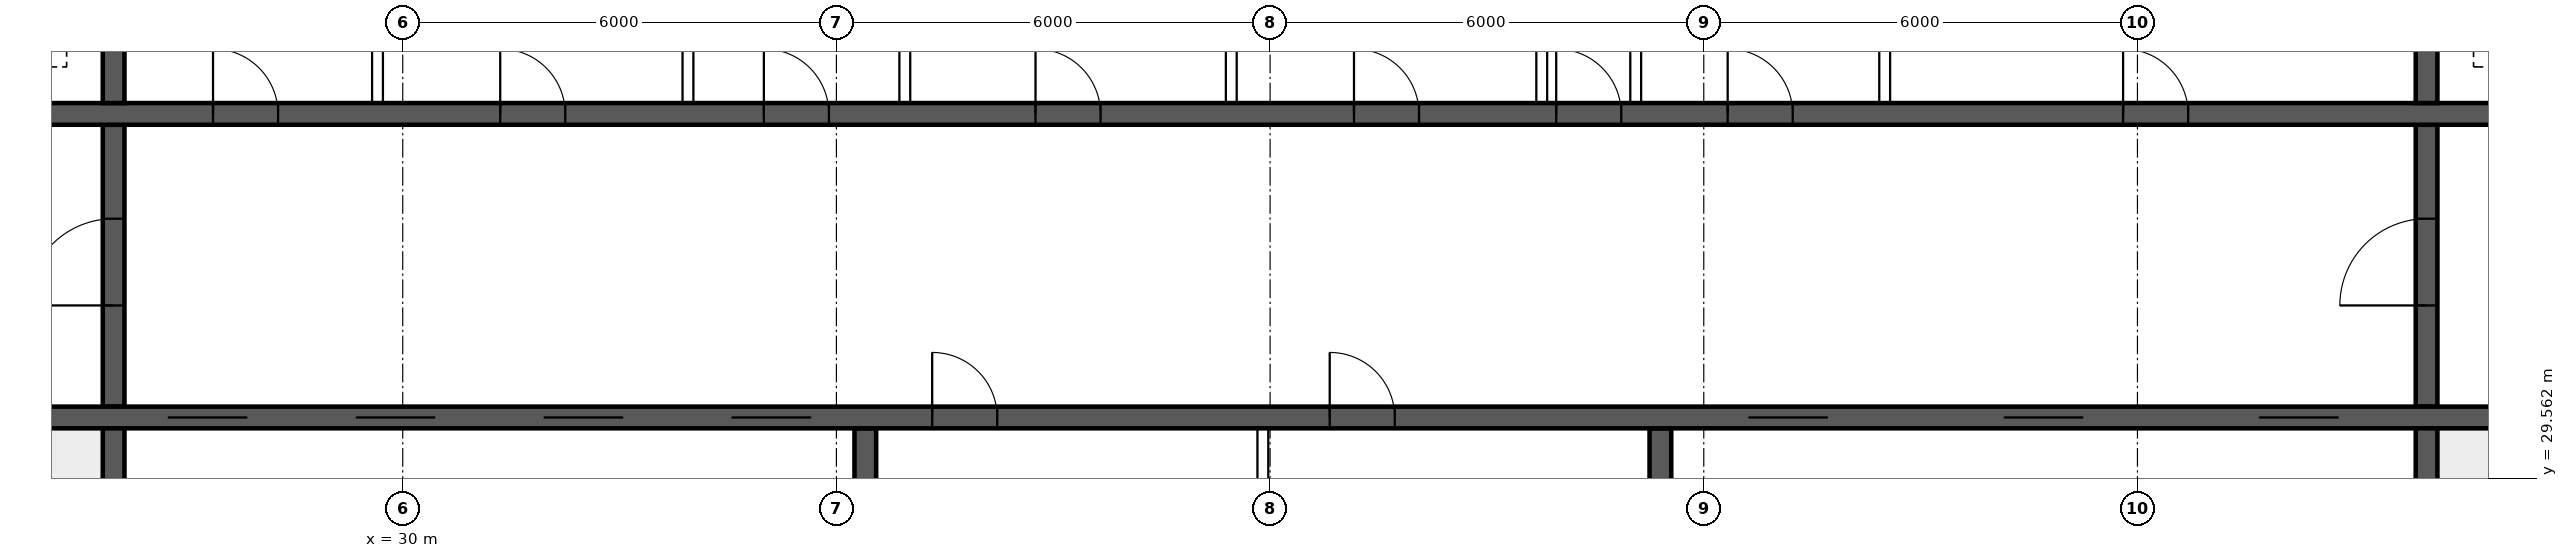
"""IFC4 building model, lengths in metres.
Left out: names, types, materials, properties, quantities, classifications, styles, units other than length and angle.
Written with IfcOpenShell. Run it as: python <this file> out.ifc"""

import sys

from ifc_helpers import new_model, si_unit, direction, frame, frame_2d, origin, place, context, subcontext, project, spatial, rectangle, extrude, element, fill, save


model = new_model("IFC4")
c1 = context("Model", 3, precision=1e-05, world=origin(), true_north=direction((0.0, 1.0)))
c2 = subcontext(c1, "Body", "Model", "MODEL_VIEW")
j1 = project(units=[si_unit("LENGTHUNIT", "METRE"), si_unit("PLANEANGLEUNIT", "RADIAN")], contexts=[c1])
p1 = place(None, origin())
s1 = spatial("IfcSite", under=j1, at=p1, CompositionType="ELEMENT")
p2 = place(p1, origin())
s2 = spatial("IfcBuilding", under=s1, at=p2, CompositionType="ELEMENT")
p3 = place(p2, frame((0.0, 0.0, 250.3)))
s3 = spatial("IfcBuildingStorey", under=s2, at=p3, CompositionType="ELEMENT", Elevation=250.3)
p4 = place(p3, frame((18.35, 30.4, 0.0), z_axis=(0.0, 0.0, 1.0), x_axis=(1.0, 0.0, 0.0)))
e1 = element("IfcWall", 1, at=p4, inside=s3, PredefinedType="SHEAR", context=c2, shape_type="SweptSolid", body=[
    extrude(rectangle(XDim=47.3, YDim=0.3, at=frame_2d((23.65, 0.0))), origin(), (0.0, 0.0, 1.0), 3.75),
])
p5 = place(p4, frame((0.4, 0.0, 0.0)))
e2 = element("IfcOpeningElement", 2, at=p5, cuts=e1, PredefinedType="OPENING", context=c2, shape_type="SweptSolid", body=[
    extrude(rectangle(XDim=1.0, YDim=2.1, at=frame_2d((0.5, 1.05))), frame((0.0, 0.16, 0.0), z_axis=(0.0, -1.0, 0.0), x_axis=(1.0, 0.0, 0.0)), (0.0, 0.0, 1.0), 0.32),
])
p6 = place(p4, frame((45.9, 0.0, 0.0)))
e3 = element("IfcOpeningElement", 3, at=p6, cuts=e1, PredefinedType="OPENING", context=c2, shape_type="SweptSolid", body=[
    extrude(rectangle(XDim=1.0, YDim=2.1, at=frame_2d((0.5, 1.05))), frame((0.0, 0.16, 0.0), z_axis=(0.0, -1.0, 0.0), x_axis=(1.0, 0.0, 0.0)), (0.0, 0.0, 1.0), 0.32),
])
p7 = place(p4, frame((8.4, 0.0, 0.0)))
e4 = element("IfcOpeningElement", 4, at=p7, cuts=e1, PredefinedType="OPENING", context=c2, shape_type="SweptSolid", body=[
    extrude(rectangle(XDim=1.1, YDim=2.1, at=frame_2d((0.55, 1.05))), frame((0.0, 0.16, 0.0), z_axis=(0.0, -1.0, 0.0), x_axis=(1.0, 0.0, 0.0)), (0.0, 0.0, 1.0), 0.32),
])
p8 = place(p4, frame((11.0, 0.0, 0.0)))
e5 = element("IfcOpeningElement", 5, at=p8, cuts=e1, PredefinedType="OPENING", context=c2, shape_type="SweptSolid", body=[
    extrude(rectangle(XDim=1.1, YDim=2.1, at=frame_2d((0.55, 1.05))), frame((0.0, 0.16, 0.0), z_axis=(0.0, -1.0, 0.0), x_axis=(1.0, 0.0, 0.0)), (0.0, 0.0, 1.0), 0.32),
])
p9 = place(p4, frame((13.6, 0.0, 0.0)))
e6 = element("IfcOpeningElement", 6, at=p9, cuts=e1, PredefinedType="OPENING", context=c2, shape_type="SweptSolid", body=[
    extrude(rectangle(XDim=1.1, YDim=2.1, at=frame_2d((0.55, 1.05))), frame((0.0, 0.16, 0.0), z_axis=(0.0, -1.0, 0.0), x_axis=(1.0, 0.0, 0.0)), (0.0, 0.0, 1.0), 0.32),
])
p10 = place(p4, frame((16.2, 0.0, 0.0)))
e7 = element("IfcOpeningElement", 7, at=p10, cuts=e1, PredefinedType="OPENING", context=c2, shape_type="SweptSolid", body=[
    extrude(rectangle(XDim=1.1, YDim=2.1, at=frame_2d((0.55, 1.05))), frame((0.0, 0.16, 0.0), z_axis=(0.0, -1.0, 0.0), x_axis=(1.0, 0.0, 0.0)), (0.0, 0.0, 1.0), 0.32),
])
p11 = place(p4, frame((18.975, 0.0, 0.0)))
e8 = element("IfcOpeningElement", 8, at=p11, cuts=e1, PredefinedType="OPENING", context=c2, shape_type="SweptSolid", body=[
    extrude(rectangle(XDim=0.9, YDim=2.1, at=frame_2d((0.45, 1.05))), frame((0.0, 0.16, 0.0), z_axis=(0.0, -1.0, 0.0), x_axis=(1.0, 0.0, 0.0)), (0.0, 0.0, 1.0), 0.32),
])
p12 = place(p4, frame((24.475, 0.0, 0.0)))
e9 = element("IfcOpeningElement", 9, at=p12, cuts=e1, PredefinedType="OPENING", context=c2, shape_type="SweptSolid", body=[
    extrude(rectangle(XDim=0.9, YDim=2.1, at=frame_2d((0.45, 1.05))), frame((0.0, 0.16, 0.0), z_axis=(0.0, -1.0, 0.0), x_axis=(1.0, 0.0, 0.0)), (0.0, 0.0, 1.0), 0.32),
])
p13 = place(p4, frame((30.267, 0.0, 0.0)))
e10 = element("IfcOpeningElement", 10, at=p13, cuts=e1, PredefinedType="OPENING", context=c2, shape_type="SweptSolid", body=[
    extrude(rectangle(XDim=1.1, YDim=2.1, at=frame_2d((0.55, 1.05))), frame((0.0, 0.16, 0.0), z_axis=(0.0, -1.0, 0.0), x_axis=(1.0, 0.0, 0.0)), (0.0, 0.0, 1.0), 0.32),
])
p14 = place(p4, frame((33.8, 0.0, 0.0)))
e11 = element("IfcOpeningElement", 11, at=p14, cuts=e1, PredefinedType="OPENING", context=c2, shape_type="SweptSolid", body=[
    extrude(rectangle(XDim=1.1, YDim=2.1, at=frame_2d((0.55, 1.05))), frame((0.0, 0.16, 0.0), z_axis=(0.0, -1.0, 0.0), x_axis=(1.0, 0.0, 0.0)), (0.0, 0.0, 1.0), 0.32),
])
p15 = place(p4, frame((37.333, 0.0, 0.0)))
e12 = element("IfcOpeningElement", 12, at=p15, cuts=e1, PredefinedType="OPENING", context=c2, shape_type="SweptSolid", body=[
    extrude(rectangle(XDim=1.1, YDim=2.1, at=frame_2d((0.55, 1.05))), frame((0.0, 0.16, 0.0), z_axis=(0.0, -1.0, 0.0), x_axis=(1.0, 0.0, 0.0)), (0.0, 0.0, 1.0), 0.32),
])
p16 = place(p3, frame((18.35, 34.6, 0.0), z_axis=(0.0, 0.0, 1.0), x_axis=(1.0, 0.0, 0.0)))
e13 = element("IfcWall", 13, at=p16, inside=s3, PredefinedType="SHEAR", context=c2, shape_type="SweptSolid", body=[
    extrude(rectangle(XDim=47.3, YDim=0.3, at=frame_2d((23.65, 0.0))), origin(), (0.0, 0.0, 1.0), 3.75),
])
p17 = place(p16, frame((0.9, 0.0, 0.0)))
e14 = element("IfcOpeningElement", 14, at=p17, cuts=e13, PredefinedType="OPENING", context=c2, shape_type="SweptSolid", body=[
    extrude(rectangle(XDim=1.1, YDim=2.1, at=frame_2d((0.55, 1.05))), frame((0.0, 0.16, 0.0), z_axis=(0.0, -1.0, 0.0), x_axis=(1.0, 0.0, 0.0)), (0.0, 0.0, 1.0), 0.32),
])
p18 = place(p16, frame((45.3, 0.0, 0.0)))
e15 = element("IfcOpeningElement", 15, at=p18, cuts=e13, PredefinedType="OPENING", context=c2, shape_type="SweptSolid", body=[
    extrude(rectangle(XDim=1.1, YDim=2.1, at=frame_2d((0.55, 1.05))), frame((0.0, 0.16, 0.0), z_axis=(0.0, -1.0, 0.0), x_axis=(1.0, 0.0, 0.0)), (0.0, 0.0, 1.0), 0.32),
])
p19 = place(p16, frame((4.25, 0.0, 0.0)))
e16 = element("IfcOpeningElement", 16, at=p19, cuts=e13, PredefinedType="OPENING", context=c2, shape_type="SweptSolid", body=[
    extrude(rectangle(XDim=0.9, YDim=2.1, at=frame_2d((0.45, 1.05))), frame((0.0, 0.16, 0.0), z_axis=(0.0, -1.0, 0.0), x_axis=(1.0, 0.0, 0.0)), (0.0, 0.0, 1.0), 0.32),
])
p20 = place(p16, frame((42.15, 0.0, 0.0)))
e17 = element("IfcOpeningElement", 17, at=p20, cuts=e13, PredefinedType="OPENING", context=c2, shape_type="SweptSolid", body=[
    extrude(rectangle(XDim=0.9, YDim=2.1, at=frame_2d((0.45, 1.05))), frame((0.0, 0.16, 0.0), z_axis=(0.0, -1.0, 0.0), x_axis=(1.0, 0.0, 0.0)), (0.0, 0.0, 1.0), 0.32),
])
p21 = place(p16, frame((9.025, 0.0, 0.0)))
e18 = element("IfcOpeningElement", 18, at=p21, cuts=e13, PredefinedType="OPENING", context=c2, shape_type="SweptSolid", body=[
    extrude(rectangle(XDim=0.9, YDim=2.1, at=frame_2d((0.45, 1.05))), frame((0.0, 0.16, 0.0), z_axis=(0.0, -1.0, 0.0), x_axis=(1.0, 0.0, 0.0)), (0.0, 0.0, 1.0), 0.32),
])
p22 = place(p16, frame((12.999, 0.0, 0.0)))
e19 = element("IfcOpeningElement", 19, at=p22, cuts=e13, PredefinedType="OPENING", context=c2, shape_type="SweptSolid", body=[
    extrude(rectangle(XDim=0.9, YDim=2.1, at=frame_2d((0.45, 1.05))), frame((0.0, 0.16, 0.0), z_axis=(0.0, -1.0, 0.0), x_axis=(1.0, 0.0, 0.0)), (0.0, 0.0, 1.0), 0.32),
])
p23 = place(p16, frame((16.646, 0.0, 0.0)))
e20 = element("IfcOpeningElement", 20, at=p23, cuts=e13, PredefinedType="OPENING", context=c2, shape_type="SweptSolid", body=[
    extrude(rectangle(XDim=0.9, YDim=2.1, at=frame_2d((0.45, 1.05))), frame((0.0, 0.16, 0.0), z_axis=(0.0, -1.0, 0.0), x_axis=(1.0, 0.0, 0.0)), (0.0, 0.0, 1.0), 0.32),
])
p24 = place(p16, frame((20.405, 0.0, 0.0)))
e21 = element("IfcOpeningElement", 21, at=p24, cuts=e13, PredefinedType="OPENING", context=c2, shape_type="SweptSolid", body=[
    extrude(rectangle(XDim=0.9, YDim=2.1, at=frame_2d((0.45, 1.05))), frame((0.0, 0.16, 0.0), z_axis=(0.0, -1.0, 0.0), x_axis=(1.0, 0.0, 0.0)), (0.0, 0.0, 1.0), 0.32),
])
p25 = place(p16, frame((24.811, 0.0, 0.0)))
e22 = element("IfcOpeningElement", 22, at=p25, cuts=e13, PredefinedType="OPENING", context=c2, shape_type="SweptSolid", body=[
    extrude(rectangle(XDim=0.9, YDim=2.1, at=frame_2d((0.45, 1.05))), frame((0.0, 0.16, 0.0), z_axis=(0.0, -1.0, 0.0), x_axis=(1.0, 0.0, 0.0)), (0.0, 0.0, 1.0), 0.32),
])
p26 = place(p16, frame((27.608, 0.0, 0.0)))
e23 = element("IfcOpeningElement", 23, at=p26, cuts=e13, PredefinedType="OPENING", context=c2, shape_type="SweptSolid", body=[
    extrude(rectangle(XDim=0.9, YDim=2.1, at=frame_2d((0.45, 1.05))), frame((0.0, 0.16, 0.0), z_axis=(0.0, -1.0, 0.0), x_axis=(1.0, 0.0, 0.0)), (0.0, 0.0, 1.0), 0.32),
])
p27 = place(p16, frame((29.981, 0.0, 0.0)))
e24 = element("IfcOpeningElement", 24, at=p27, cuts=e13, PredefinedType="OPENING", context=c2, shape_type="SweptSolid", body=[
    extrude(rectangle(XDim=0.9, YDim=2.1, at=frame_2d((0.45, 1.05))), frame((0.0, 0.16, 0.0), z_axis=(0.0, -1.0, 0.0), x_axis=(1.0, 0.0, 0.0)), (0.0, 0.0, 1.0), 0.32),
])
p28 = place(p16, frame((35.451, 0.0, 0.0)))
e25 = element("IfcOpeningElement", 25, at=p28, cuts=e13, PredefinedType="OPENING", context=c2, shape_type="SweptSolid", body=[
    extrude(rectangle(XDim=0.9, YDim=2.1, at=frame_2d((0.45, 1.05))), frame((0.0, 0.16, 0.0), z_axis=(0.0, -1.0, 0.0), x_axis=(1.0, 0.0, 0.0)), (0.0, 0.0, 1.0), 0.32),
])
for number, where, z_axis, x_axis in (
    (26, (26.0, 26.15, 0.0), (0.0, 0.0, 1.0), (0.0, 1.0, 0.0)),
    (27, (58.0, 26.15, 0.0), (0.0, 0.0, 1.0), (0.0, 1.0, 0.0)),
):
    element("IfcWall", number, at=place(p3, frame(where, z_axis=z_axis, x_axis=x_axis)), inside=s3, PredefinedType="SHEAR", context=c2, shape_type="SweptSolid", body=[
        extrude(rectangle(XDim=4.1, YDim=0.3, at=frame_2d((2.05, 0.0))), origin(), (0.0, 0.0, 1.0), 3.75),
    ])
p29 = place(p3, frame((26.0, 30.55, 0.0), z_axis=(0.0, 0.0, 1.0), x_axis=(0.0, 1.0, 0.0)))
e28 = element("IfcWall", 28, at=p29, inside=s3, PredefinedType="SHEAR", context=c2, shape_type="SweptSolid", body=[
    extrude(rectangle(XDim=3.9, YDim=0.3, at=frame_2d((1.95, 0.0))), origin(), (0.0, 0.0, 1.0), 3.75),
])
p30 = place(p29, frame((1.4, 0.0, 0.0)))
e29 = element("IfcOpeningElement", 29, at=p30, cuts=e28, PredefinedType="OPENING", context=c2, shape_type="SweptSolid", body=[
    extrude(rectangle(XDim=1.2, YDim=2.1, at=frame_2d((0.6, 1.05))), frame((0.0, 0.16, 0.0), z_axis=(0.0, -1.0, 0.0), x_axis=(1.0, 0.0, 0.0)), (0.0, 0.0, 1.0), 0.32),
])
p31 = place(p3, frame((58.0, 30.55, 0.0), z_axis=(0.0, 0.0, 1.0), x_axis=(0.0, 1.0, 0.0)))
e30 = element("IfcWall", 30, at=p31, inside=s3, PredefinedType="SHEAR", context=c2, shape_type="SweptSolid", body=[
    extrude(rectangle(XDim=3.9, YDim=0.3, at=frame_2d((1.95, 0.0))), origin(), (0.0, 0.0, 1.0), 3.75),
])
p32 = place(p31, frame((1.4, 0.0, 0.0)))
e31 = element("IfcOpeningElement", 31, at=p32, cuts=e30, PredefinedType="OPENING", context=c2, shape_type="SweptSolid", body=[
    extrude(rectangle(XDim=1.2, YDim=2.1, at=frame_2d((0.6, 1.05))), frame((0.0, 0.16, 0.0), z_axis=(0.0, -1.0, 0.0), x_axis=(1.0, 0.0, 0.0)), (0.0, 0.0, 1.0), 0.32),
])
for number, where, z_axis, x_axis in (
    (32, (26.0, 34.75, 0.0), (0.0, 0.0, 1.0), (0.0, 1.0, 0.0)),
    (33, (58.0, 34.75, 0.0), (0.0, 0.0, 1.0), (0.0, 1.0, 0.0)),
):
    element("IfcWall", number, at=place(p3, frame(where, z_axis=z_axis, x_axis=x_axis)), inside=s3, PredefinedType="SHEAR", context=c2, shape_type="SweptSolid", body=[
        extrude(rectangle(XDim=3.1, YDim=0.3, at=frame_2d((1.55, 0.0))), origin(), (0.0, 0.0, 1.0), 3.75),
    ])
for number, where, z_axis, x_axis in (
    (34, (36.4, 26.15, 0.0), (0.0, 0.0, 1.0), (0.0, 1.0, 0.0)),
    (35, (47.4, 26.15, 0.0), (0.0, 0.0, 1.0), (0.0, 1.0, 0.0)),
):
    element("IfcWall", number, at=place(p3, frame(where, z_axis=z_axis, x_axis=x_axis)), inside=s3, PredefinedType="SHEAR", context=c2, shape_type="SweptSolid", body=[
        extrude(rectangle(XDim=4.1, YDim=0.3, at=frame_2d((2.05, 0.0))), origin(), (0.0, 0.0, 1.0), 3.75),
    ])
for number, where, z_axis, x_axis in (
    (36, (29.651, 34.75, 0.0), (0.0, 0.0, 1.0), (0.0, 1.0, 0.0)),
    (37, (33.946, 34.75, 0.0), (0.0, 0.0, 1.0), (0.0, 1.0, 0.0)),
    (38, (36.946, 34.75, 0.0), (0.0, 0.0, 1.0), (0.0, 1.0, 0.0)),
    (39, (41.463, 34.75, 0.0), (0.0, 0.0, 1.0), (0.0, 1.0, 0.0)),
    (40, (45.758, 34.75, 0.0), (0.0, 0.0, 1.0), (0.0, 1.0, 0.0)),
    (41, (47.058, 34.75, 0.0), (0.0, 0.0, 1.0), (0.0, 1.0, 0.0)),
    (42, (50.503, 34.75, 0.0), (0.0, 0.0, 1.0), (0.0, 1.0, 0.0)),
):
    element("IfcWall", number, at=place(p3, frame(where, z_axis=z_axis, x_axis=x_axis)), inside=s3, PredefinedType="SOLIDWALL", context=c2, shape_type="SweptSolid", body=[
        extrude(rectangle(XDim=3.1, YDim=0.15, at=frame_2d((1.55, 0.0))), origin(), (0.0, 0.0, 1.0), 3.5),
    ])
p33 = place(p3, frame((41.9, 26.15, 0.0), z_axis=(0.0, 0.0, 1.0), x_axis=(0.0, 1.0, 0.0)))
e43 = element("IfcWall", 43, at=p33, inside=s3, PredefinedType="SOLIDWALL", context=c2, shape_type="SweptSolid", body=[
    extrude(rectangle(XDim=4.1, YDim=0.15, at=frame_2d((2.05, 0.0))), origin(), (0.0, 0.0, 1.0), 3.5),
])
p34 = place(p30, origin())
e44 = element("IfcDoor", 44, at=p34, inside=s3, OperationType="SINGLE_SWING_LEFT", PredefinedType="DOOR", context=c2, shape_type="SweptSolid", body=[
    extrude(rectangle(XDim=1.2, YDim=2.1, at=frame_2d((0.6, 1.05))), frame((0.0, 0.025, 0.0), z_axis=(0.0, -1.0, 0.0), x_axis=(1.0, 0.0, 0.0)), (0.0, 0.0, 1.0), 0.05),
])
fill(e29, e44)
p35 = place(p32, origin())
e45 = element("IfcDoor", 45, at=p35, inside=s3, OperationType="SINGLE_SWING_LEFT", PredefinedType="DOOR", context=c2, shape_type="SweptSolid", body=[
    extrude(rectangle(XDim=1.2, YDim=2.1, at=frame_2d((0.6, 1.05))), frame((0.0, 0.025, 0.0), z_axis=(0.0, -1.0, 0.0), x_axis=(1.0, 0.0, 0.0)), (0.0, 0.0, 1.0), 0.05),
])
fill(e31, e45)
p36 = place(p21, origin())
e46 = element("IfcDoor", 46, at=p36, inside=s3, OperationType="SINGLE_SWING_LEFT", PredefinedType="DOOR", context=c2, shape_type="SweptSolid", body=[
    extrude(rectangle(XDim=0.9, YDim=2.1, at=frame_2d((0.45, 1.05))), frame((0.0, 0.025, 0.0), z_axis=(0.0, -1.0, 0.0), x_axis=(1.0, 0.0, 0.0)), (0.0, 0.0, 1.0), 0.05),
])
fill(e18, e46)
p37 = place(p22, origin())
e47 = element("IfcDoor", 47, at=p37, inside=s3, OperationType="SINGLE_SWING_LEFT", PredefinedType="DOOR", context=c2, shape_type="SweptSolid", body=[
    extrude(rectangle(XDim=0.9, YDim=2.1, at=frame_2d((0.45, 1.05))), frame((0.0, 0.025, 0.0), z_axis=(0.0, -1.0, 0.0), x_axis=(1.0, 0.0, 0.0)), (0.0, 0.0, 1.0), 0.05),
])
fill(e19, e47)
p38 = place(p23, origin())
e48 = element("IfcDoor", 48, at=p38, inside=s3, OperationType="SINGLE_SWING_LEFT", PredefinedType="DOOR", context=c2, shape_type="SweptSolid", body=[
    extrude(rectangle(XDim=0.9, YDim=2.1, at=frame_2d((0.45, 1.05))), frame((0.0, 0.025, 0.0), z_axis=(0.0, -1.0, 0.0), x_axis=(1.0, 0.0, 0.0)), (0.0, 0.0, 1.0), 0.05),
])
fill(e20, e48)
p39 = place(p24, origin())
e49 = element("IfcDoor", 49, at=p39, inside=s3, OperationType="SINGLE_SWING_LEFT", PredefinedType="DOOR", context=c2, shape_type="SweptSolid", body=[
    extrude(rectangle(XDim=0.9, YDim=2.1, at=frame_2d((0.45, 1.05))), frame((0.0, 0.025, 0.0), z_axis=(0.0, -1.0, 0.0), x_axis=(1.0, 0.0, 0.0)), (0.0, 0.0, 1.0), 0.05),
])
fill(e21, e49)
p40 = place(p25, origin())
e50 = element("IfcDoor", 50, at=p40, inside=s3, OperationType="SINGLE_SWING_LEFT", PredefinedType="DOOR", context=c2, shape_type="SweptSolid", body=[
    extrude(rectangle(XDim=0.9, YDim=2.1, at=frame_2d((0.45, 1.05))), frame((0.0, 0.025, 0.0), z_axis=(0.0, -1.0, 0.0), x_axis=(1.0, 0.0, 0.0)), (0.0, 0.0, 1.0), 0.05),
])
fill(e22, e50)
p41 = place(p26, origin())
e51 = element("IfcDoor", 51, at=p41, inside=s3, OperationType="SINGLE_SWING_LEFT", PredefinedType="DOOR", context=c2, shape_type="SweptSolid", body=[
    extrude(rectangle(XDim=0.9, YDim=2.1, at=frame_2d((0.45, 1.05))), frame((0.0, 0.025, 0.0), z_axis=(0.0, -1.0, 0.0), x_axis=(1.0, 0.0, 0.0)), (0.0, 0.0, 1.0), 0.05),
])
fill(e23, e51)
p42 = place(p27, origin())
e52 = element("IfcDoor", 52, at=p42, inside=s3, OperationType="SINGLE_SWING_LEFT", PredefinedType="DOOR", context=c2, shape_type="SweptSolid", body=[
    extrude(rectangle(XDim=0.9, YDim=2.1, at=frame_2d((0.45, 1.05))), frame((0.0, 0.025, 0.0), z_axis=(0.0, -1.0, 0.0), x_axis=(1.0, 0.0, 0.0)), (0.0, 0.0, 1.0), 0.05),
])
fill(e24, e52)
p43 = place(p28, origin())
e53 = element("IfcDoor", 53, at=p43, inside=s3, OperationType="SINGLE_SWING_LEFT", PredefinedType="DOOR", context=c2, shape_type="SweptSolid", body=[
    extrude(rectangle(XDim=0.9, YDim=2.1, at=frame_2d((0.45, 1.05))), frame((0.0, 0.025, 0.0), z_axis=(0.0, -1.0, 0.0), x_axis=(1.0, 0.0, 0.0)), (0.0, 0.0, 1.0), 0.05),
])
fill(e25, e53)
p44 = place(p7, origin())
e54 = element("IfcDoor", 54, at=p44, inside=s3, OperationType="DOUBLE_DOOR_SLIDING", PredefinedType="DOOR", context=c2, shape_type="SweptSolid", body=[
    extrude(rectangle(XDim=1.1, YDim=2.1, at=frame_2d((0.55, 1.05))), frame((0.0, 0.025, 0.0), z_axis=(0.0, -1.0, 0.0), x_axis=(1.0, 0.0, 0.0)), (0.0, 0.0, 1.0), 0.05),
])
fill(e4, e54)
p45 = place(p8, origin())
e55 = element("IfcDoor", 55, at=p45, inside=s3, OperationType="DOUBLE_DOOR_SLIDING", PredefinedType="DOOR", context=c2, shape_type="SweptSolid", body=[
    extrude(rectangle(XDim=1.1, YDim=2.1, at=frame_2d((0.55, 1.05))), frame((0.0, 0.025, 0.0), z_axis=(0.0, -1.0, 0.0), x_axis=(1.0, 0.0, 0.0)), (0.0, 0.0, 1.0), 0.05),
])
fill(e5, e55)
p46 = place(p9, origin())
e56 = element("IfcDoor", 56, at=p46, inside=s3, OperationType="DOUBLE_DOOR_SLIDING", PredefinedType="DOOR", context=c2, shape_type="SweptSolid", body=[
    extrude(rectangle(XDim=1.1, YDim=2.1, at=frame_2d((0.55, 1.05))), frame((0.0, 0.025, 0.0), z_axis=(0.0, -1.0, 0.0), x_axis=(1.0, 0.0, 0.0)), (0.0, 0.0, 1.0), 0.05),
])
fill(e6, e56)
p47 = place(p10, origin())
e57 = element("IfcDoor", 57, at=p47, inside=s3, OperationType="DOUBLE_DOOR_SLIDING", PredefinedType="DOOR", context=c2, shape_type="SweptSolid", body=[
    extrude(rectangle(XDim=1.1, YDim=2.1, at=frame_2d((0.55, 1.05))), frame((0.0, 0.025, 0.0), z_axis=(0.0, -1.0, 0.0), x_axis=(1.0, 0.0, 0.0)), (0.0, 0.0, 1.0), 0.05),
])
fill(e7, e57)
p48 = place(p11, origin())
e58 = element("IfcDoor", 58, at=p48, inside=s3, OperationType="SINGLE_SWING_LEFT", PredefinedType="DOOR", context=c2, shape_type="SweptSolid", body=[
    extrude(rectangle(XDim=0.9, YDim=2.1, at=frame_2d((0.45, 1.05))), frame((0.0, 0.025, 0.0), z_axis=(0.0, -1.0, 0.0), x_axis=(1.0, 0.0, 0.0)), (0.0, 0.0, 1.0), 0.05),
])
fill(e8, e58)
p49 = place(p12, origin())
e59 = element("IfcDoor", 59, at=p49, inside=s3, OperationType="SINGLE_SWING_LEFT", PredefinedType="DOOR", context=c2, shape_type="SweptSolid", body=[
    extrude(rectangle(XDim=0.9, YDim=2.1, at=frame_2d((0.45, 1.05))), frame((0.0, 0.025, 0.0), z_axis=(0.0, -1.0, 0.0), x_axis=(1.0, 0.0, 0.0)), (0.0, 0.0, 1.0), 0.05),
])
fill(e9, e59)
p50 = place(p13, origin())
e60 = element("IfcDoor", 60, at=p50, inside=s3, OperationType="DOUBLE_DOOR_SLIDING", PredefinedType="DOOR", context=c2, shape_type="SweptSolid", body=[
    extrude(rectangle(XDim=1.1, YDim=2.1, at=frame_2d((0.55, 1.05))), frame((0.0, 0.025, 0.0), z_axis=(0.0, -1.0, 0.0), x_axis=(1.0, 0.0, 0.0)), (0.0, 0.0, 1.0), 0.05),
])
fill(e10, e60)
p51 = place(p14, origin())
e61 = element("IfcDoor", 61, at=p51, inside=s3, OperationType="DOUBLE_DOOR_SLIDING", PredefinedType="DOOR", context=c2, shape_type="SweptSolid", body=[
    extrude(rectangle(XDim=1.1, YDim=2.1, at=frame_2d((0.55, 1.05))), frame((0.0, 0.025, 0.0), z_axis=(0.0, -1.0, 0.0), x_axis=(1.0, 0.0, 0.0)), (0.0, 0.0, 1.0), 0.05),
])
fill(e11, e61)
p52 = place(p15, origin())
e62 = element("IfcDoor", 62, at=p52, inside=s3, OperationType="DOUBLE_DOOR_SLIDING", PredefinedType="DOOR", context=c2, shape_type="SweptSolid", body=[
    extrude(rectangle(XDim=1.1, YDim=2.1, at=frame_2d((0.55, 1.05))), frame((0.0, 0.025, 0.0), z_axis=(0.0, -1.0, 0.0), x_axis=(1.0, 0.0, 0.0)), (0.0, 0.0, 1.0), 0.05),
])
fill(e12, e62)
save(model, sys.argv[1])
